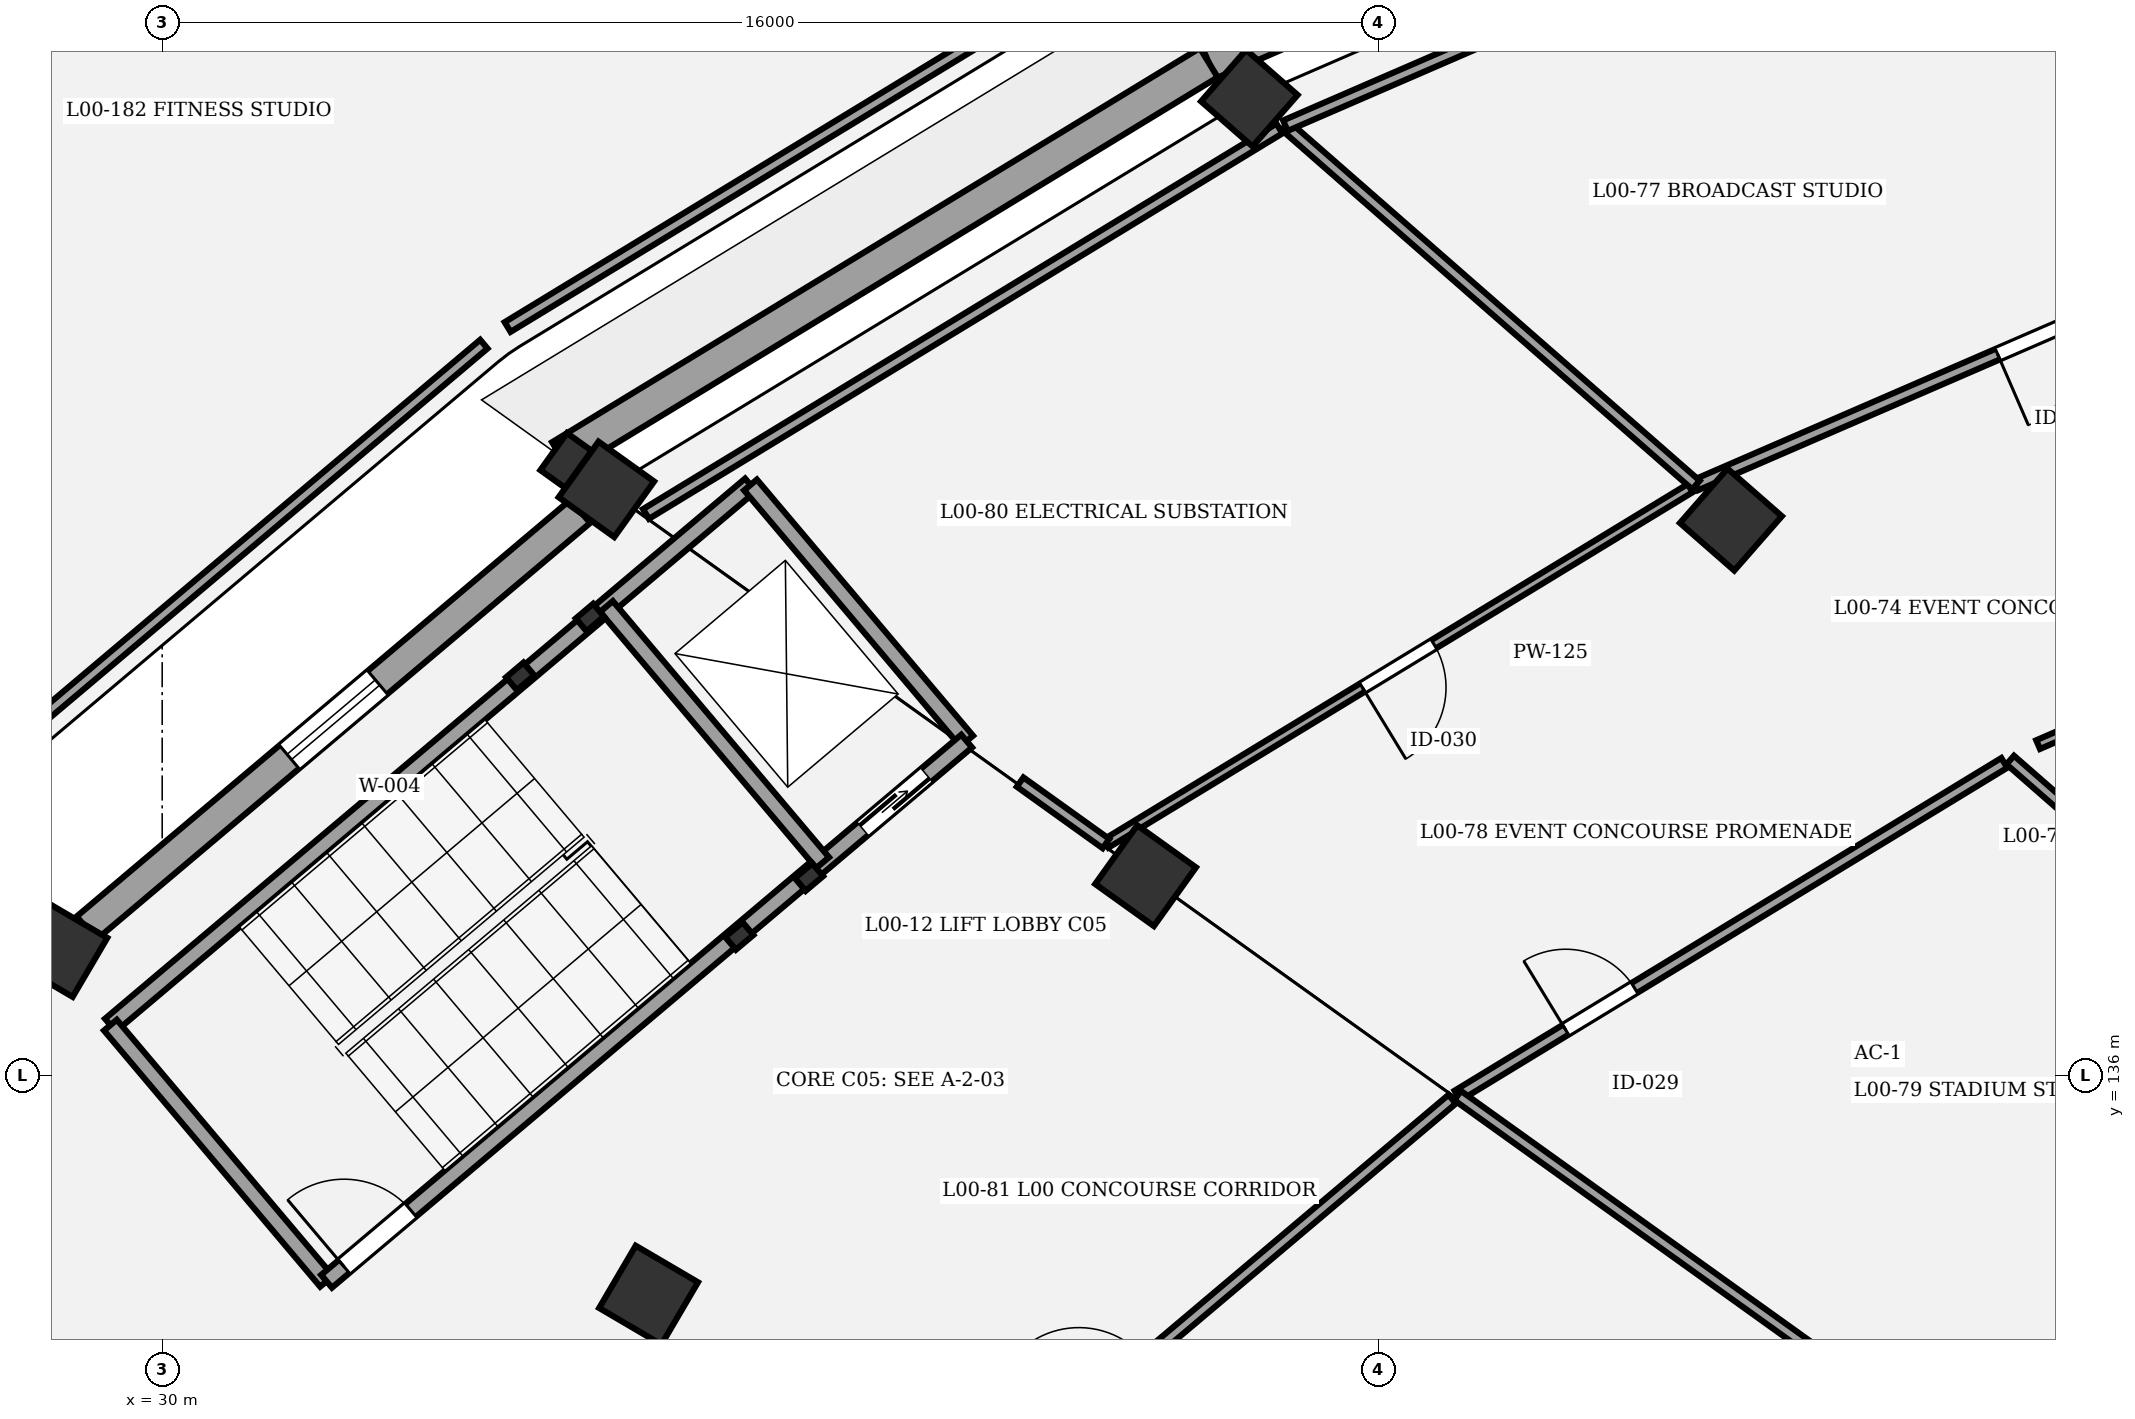
"""IFC4 building model, lengths in metres.
Left out: names, types, materials, properties, quantities, classifications, styles, units other than length and angle.
Written with IfcOpenShell. Run it as: python <this file> out.ifc"""

import sys

from ifc_helpers import new_model, si_unit, direction, frame, frame_2d, origin, origin_2d, place, context, subcontext, project, spatial, rectangle, extrude, element, fill, save


model = new_model("IFC4")
c1 = context("Model", 3, precision=1e-05, world=origin(), true_north=direction((0.0, 1.0)))
c2 = subcontext(c1, "Body", "Model", "MODEL_VIEW")
j1 = project(units=[si_unit("LENGTHUNIT", "METRE"), si_unit("PLANEANGLEUNIT", "RADIAN")], contexts=[c1])
p1 = place(None, origin())
s1 = spatial("IfcSite", under=j1, at=p1, CompositionType="ELEMENT")
p2 = place(p1, origin())
s2 = spatial("IfcBuilding", under=s1, at=p2, CompositionType="ELEMENT")
p3 = place(p2, origin())
s3 = spatial("IfcBuildingStorey", under=s2, at=p3, CompositionType="ELEMENT", Elevation=0.0)
p4 = place(p3, frame((50.64, 143.317, 0.0), z_axis=(0.0, 0.0, 1.0), x_axis=(-0.752529860433, 0.658558128912, 0.0)))
e1 = element("IfcColumn", 1, at=p4, inside=s3, PredefinedType="COLUMN", context=c2, shape_type="SweptSolid", body=[
    extrude(rectangle(XDim=0.95, YDim=0.95, at=origin_2d()), origin(), (0.0, 0.0, 1.0), 5.4),
])
p5 = place(p3, frame((44.304, 148.861, 0.0), z_axis=(0.0, 0.0, 1.0), x_axis=(-0.752529860433, 0.658558128912, 0.0)))
e2 = element("IfcColumn", 2, at=p5, inside=s3, PredefinedType="COLUMN", context=c2, shape_type="SweptSolid", body=[
    extrude(rectangle(XDim=0.9, YDim=0.9, at=origin_2d()), origin(), (0.0, 0.0, 1.0), 5.4),
])
p6 = place(p3, frame((42.939, 138.632, 0.0), z_axis=(0.0, 0.0, 1.0), x_axis=(-0.812897512265, 0.582406760395, 0.0)))
e3 = element("IfcColumn", 3, at=p6, inside=s3, PredefinedType="COLUMN", context=c2, shape_type="SweptSolid", body=[
    extrude(rectangle(XDim=0.95, YDim=0.95, at=origin_2d()), origin(), (0.0, 0.0, 1.0), 5.4),
])
p7 = place(p3, frame((35.844, 143.715, 0.0), z_axis=(0.0, 0.0, 1.0), x_axis=(-0.812897512265, 0.582406760395, 0.0)))
e4 = element("IfcColumn", 4, at=p7, inside=s3, PredefinedType="COLUMN", context=c2, shape_type="SweptSolid", body=[
    extrude(rectangle(XDim=0.9, YDim=0.9, at=origin_2d()), origin(), (0.0, 0.0, 1.0), 5.4),
])
p8 = place(p3, frame((35.314, 144.095, 0.0), z_axis=(0.0, 0.0, 1.0), x_axis=(-0.582406760395, -0.812897512265, 0.0)))
e5 = element("IfcColumn", 5, at=p8, inside=s3, PredefinedType="PILASTER", context=c2, shape_type="SweptSolid", body=[
    extrude(rectangle(XDim=0.6, YDim=0.4, at=origin_2d()), origin(), (0.0, 0.0, 1.0), 5.4),
])
p9 = place(p3, frame((36.4, 133.114, 0.0), z_axis=(0.0, 0.0, 1.0), x_axis=(-0.862513669207, 0.506033764121, 0.0)))
e6 = element("IfcColumn", 6, at=p9, inside=s3, PredefinedType="COLUMN", context=c2, shape_type="SweptSolid", body=[
    extrude(rectangle(XDim=0.95, YDim=0.95, at=origin_2d()), origin(), (0.0, 0.0, 1.0), 5.4),
])
p10 = place(p3, frame((28.662, 137.654, 0.0), z_axis=(0.0, 0.0, 1.0), x_axis=(-0.862513669207, 0.506033764121, 0.0)))
e7 = element("IfcColumn", 7, at=p10, inside=s3, PredefinedType="COLUMN", context=c2, shape_type="SweptSolid", body=[
    extrude(rectangle(XDim=0.9, YDim=0.9, at=origin_2d()), origin(), (0.0, 0.0, 1.0), 5.4),
])
p11 = place(p3, frame((53.603, 153.59, 0.0), z_axis=(0.0, 0.0, 1.0), x_axis=(-0.917502700529, -0.397729549471, 0.0)))
e8 = element("IfcWall", 8, at=p11, inside=s3, PredefinedType="USERDEFINED", context=c2, shape_type="SweptSolid", body=[
    extrude(rectangle(XDim=10.716, YDim=0.45, at=frame_2d((5.358, 0.0))), origin(), (0.0, 0.0, 1.0), 4.25),
])
p12 = place(p3, frame((43.77, 149.328, 0.0), z_axis=(0.0, 0.0, 1.0), x_axis=(-0.854319977813, -0.519747415106, 0.0)))
e9 = element("IfcWall", 9, at=p12, inside=s3, PredefinedType="USERDEFINED", context=c2, shape_type="SweptSolid", body=[
    extrude(rectangle(XDim=9.977, YDim=0.45, at=frame_2d((4.988, 0.0))), origin(), (0.0, 0.0, 1.0), 4.25),
])
p13 = place(p3, frame((29.004, 137.942, 0.0), z_axis=(0.0, 0.0, 1.0), x_axis=(0.764254773348, 0.644914445035, 0.0)))
e10 = element("IfcWall", 10, at=p13, inside=s3, PredefinedType="STANDARD", context=c2, shape_type="SweptSolid", body=[
    extrude(rectangle(XDim=8.502, YDim=0.4, at=frame_2d((4.251, 0.0))), origin(), (0.0, 0.0, 1.0), 4.25),
])
p14 = place(p13, frame((3.491, 0.0, 1.1)))
e11 = element("IfcOpeningElement", 11, at=p14, cuts=e10, PredefinedType="OPENING", context=c2, shape_type="SweptSolid", body=[
    extrude(rectangle(XDim=1.52, YDim=1.55, at=frame_2d((0.76, 0.775))), frame((0.0, 0.21, 0.0), z_axis=(0.0, -1.0, 0.0), x_axis=(1.0, 0.0, 0.0)), (0.0, 0.0, 1.0), 0.42),
])
for number, where, z_axis, x_axis in (
    (12, (37.593, 137.839, 0.0), (0.0, 0.0, 1.0), (0.764, 0.645, 0.0)),
    (13, (38.51, 138.613, 0.0), (0.0, 0.0, 1.0), (0.764, 0.645, 0.0)),
    (14, (35.627, 142.029, 0.0), (0.0, 0.0, 1.0), (0.764, 0.645, 0.0)),
    (15, (34.71, 141.255, 0.0), (0.0, 0.0, 1.0), (0.764, 0.645, 0.0)),
):
    element("IfcColumn", number, at=place(p3, frame(where, z_axis=z_axis, x_axis=x_axis)), inside=s3, PredefinedType="COLUMN", context=c2, shape_type="SweptSolid", body=[
        extrude(rectangle(XDim=0.3, YDim=0.22, at=origin_2d()), origin(), (0.0, 0.0, 1.0), 5.4),
    ])
p15 = place(p3, frame((29.319, 136.666, 0.0), z_axis=(0.0, 0.0, 1.0), x_axis=(0.764247804305, 0.644922703598, 0.0)))
e16 = element("IfcWall", 16, at=p15, inside=s3, PredefinedType="SHEAR", context=c2, shape_type="SweptSolid", body=[
    extrude(rectangle(XDim=11.02, YDim=0.22, at=frame_2d((5.51, 0.0))), origin(), (0.0, 0.0, 1.0), 5.15),
])
p16 = place(p3, frame((32.163, 133.296, 0.0), z_axis=(0.0, 0.0, 1.0), x_axis=(-0.644904288042, 0.764263344185, 0.0)))
e17 = element("IfcWall", 17, at=p16, inside=s3, PredefinedType="SHEAR", context=c2, shape_type="SweptSolid", body=[
    extrude(rectangle(XDim=4.41, YDim=0.22, at=frame_2d((2.205, 0.0))), origin(), (0.0, 0.0, 1.0), 5.15),
])
p17 = place(p3, frame((40.585, 140.403, 0.0), z_axis=(0.0, 0.0, 1.0), x_axis=(-0.644936622785, 0.764236058159, 0.0)))
e18 = element("IfcWall", 18, at=p17, inside=s3, PredefinedType="SHEAR", context=c2, shape_type="SweptSolid", body=[
    extrude(rectangle(XDim=4.41, YDim=0.22, at=frame_2d((2.205, 0.0))), origin(), (0.0, 0.0, 1.0), 5.15),
])
p18 = place(p3, frame((32.163, 133.296, 0.0), z_axis=(0.0, 0.0, 1.0), x_axis=(0.764257018762, 0.644911784102, 0.0)))
e19 = element("IfcWall", 19, at=p18, inside=s3, PredefinedType="SHEAR", context=c2, shape_type="SweptSolid", body=[
    extrude(rectangle(XDim=11.02, YDim=0.22, at=frame_2d((5.51, 0.0))), origin(), (0.0, 0.0, 1.0), 5.15),
])
p19 = place(p18, frame((0.3, 0.0, 0.0)))
e20 = element("IfcOpeningElement", 20, at=p19, cuts=e19, PredefinedType="OPENING", context=c2, shape_type="SweptSolid", body=[
    extrude(rectangle(XDim=1.15, YDim=2.15, at=frame_2d((0.575, 1.075))), frame((0.0, 0.12, 0.0), z_axis=(0.0, -1.0, 0.0), x_axis=(1.0, 0.0, 0.0)), (0.0, 0.0, 1.0), 0.24),
])
p20 = place(p18, frame((9.23, 0.0, 0.0)))
e21 = element("IfcOpeningElement", 21, at=p20, cuts=e19, PredefinedType="OPENING", context=c2, shape_type="SweptSolid", body=[
    extrude(rectangle(XDim=1.1, YDim=2.15, at=frame_2d((0.55, 1.075))), frame((0.0, 0.12, 0.0), z_axis=(0.0, -1.0, 0.0), x_axis=(1.0, 0.0, 0.0)), (0.0, 0.0, 1.0), 0.24),
])
p21 = place(p3, frame((38.689, 138.803, 0.0), z_axis=(0.0, 0.0, 1.0), x_axis=(-0.644904288042, 0.764263344185, 0.0)))
e22 = element("IfcWall", 22, at=p21, inside=s3, PredefinedType="SHEAR", context=c2, shape_type="SweptSolid", body=[
    extrude(rectangle(XDim=4.41, YDim=0.22, at=frame_2d((2.205, 0.0))), origin(), (0.0, 0.0, 1.0), 5.15),
])
p22 = place(p3, frame((58.435, 141.983, 0.0), z_axis=(0.0, 0.0, 1.0), x_axis=(-0.917504086034, -0.397726353303, 0.0)))
e23 = element("IfcWall", 23, at=p22, inside=s3, PredefinedType="PARTITIONING", context=c2, shape_type="SweptSolid", body=[
    extrude(rectangle(XDim=4.091, YDim=0.125, at=frame_2d((2.045, 0.0))), origin(), (0.0, 0.0, 1.0), 4.15),
])
p23 = place(p22, frame((0.814, 0.0, 0.0)))
e24 = element("IfcOpeningElement", 24, at=p23, cuts=e23, PredefinedType="OPENING", context=c2, shape_type="SweptSolid", body=[
    extrude(rectangle(XDim=0.98, YDim=2.3, at=frame_2d((0.49, 1.15))), frame((0.0, 0.073, 0.0), z_axis=(0.0, -1.0, 0.0), x_axis=(1.0, 0.0, 0.0)), (0.0, 0.0, 1.0), 0.145),
])
p24 = place(p3, frame((59.054, 147.619, 0.0), z_axis=(0.0, 0.0, 1.0), x_axis=(-0.917508957037, -0.39771511633, 0.0)))
e25 = element("IfcWall", 25, at=p24, inside=s3, PredefinedType="PARTITIONING", context=c2, shape_type="SweptSolid", body=[
    extrude(rectangle(XDim=9.671, YDim=0.15, at=frame_2d((4.836, 0.0))), origin(), (0.0, 0.0, 1.0), 4.15),
])
p25 = place(p24, frame((4.326, 0.0, 0.0)))
e26 = element("IfcOpeningElement", 26, at=p25, cuts=e25, PredefinedType="OPENING", context=c2, shape_type="SweptSolid", body=[
    extrude(rectangle(XDim=1.02, YDim=2.3, at=frame_2d((0.51, 1.15))), frame((0.0, 0.085, 0.0), z_axis=(0.0, -1.0, 0.0), x_axis=(1.0, 0.0, 0.0)), (0.0, 0.0, 1.0), 0.17),
])
p26 = place(p3, frame((47.043, 135.74, 0.0), z_axis=(0.0, 0.0, 1.0), x_axis=(0.854330104408, 0.519730769439, 0.0)))
e27 = element("IfcWall", 27, at=p26, inside=s3, PredefinedType="PARTITIONING", context=c2, shape_type="SweptSolid", body=[
    extrude(rectangle(XDim=8.42, YDim=0.15, at=frame_2d((4.21, 0.0))), origin(), (0.0, 0.0, 1.0), 4.15),
])
p27 = place(p26, frame((1.664, 0.0, 0.0)))
e28 = element("IfcOpeningElement", 28, at=p27, cuts=e27, PredefinedType="OPENING", context=c2, shape_type="SweptSolid", body=[
    extrude(rectangle(XDim=1.06, YDim=2.3, at=frame_2d((0.53, 1.15))), frame((0.0, 0.085, 0.0), z_axis=(0.0, -1.0, 0.0), x_axis=(1.0, 0.0, 0.0)), (0.0, 0.0, 1.0), 0.17),
])
p28 = place(p3, frame((50.105, 143.731, 0.0), z_axis=(0.0, 0.0, 1.0), x_axis=(-0.854321649351, -0.519744667554, 0.0)))
e29 = element("IfcWall", 29, at=p28, inside=s3, PredefinedType="PARTITIONING", context=c2, shape_type="SweptSolid", body=[
    extrude(rectangle(XDim=8.999, YDim=0.125, at=frame_2d((4.499, 0.0))), origin(), (0.0, 0.0, 1.0), 4.15),
])
p29 = place(p28, frame((3.949, 0.0, 0.0)))
e30 = element("IfcOpeningElement", 30, at=p29, cuts=e29, PredefinedType="OPENING", context=c2, shape_type="SweptSolid", body=[
    extrude(rectangle(XDim=1.1, YDim=2.3, at=frame_2d((0.55, 1.15))), frame((0.0, 0.073, 0.0), z_axis=(0.0, -1.0, 0.0), x_axis=(1.0, 0.0, 0.0)), (0.0, 0.0, 1.0), 0.145),
])
p30 = place(p3, frame((40.867, 130.539, 0.0), z_axis=(0.0, 0.0, 1.0), x_axis=(0.764249122867, 0.644921141068, 0.0)))
e31 = element("IfcWall", 31, at=p30, inside=s3, PredefinedType="PARTITIONING", context=c2, shape_type="SweptSolid", body=[
    extrude(rectangle(XDim=7.99, YDim=0.15, at=frame_2d((3.995, 0.0))), origin(), (0.0, 0.0, 1.0), 4.15),
])
p31 = place(p30, frame((1.562, 0.0, 0.0)))
e32 = element("IfcOpeningElement", 32, at=p31, cuts=e31, PredefinedType="OPENING", context=c2, shape_type="SweptSolid", body=[
    extrude(rectangle(XDim=1.14, YDim=2.3, at=frame_2d((0.57, 1.15))), frame((0.0, 0.085, 0.0), z_axis=(0.0, -1.0, 0.0), x_axis=(1.0, 0.0, 0.0)), (0.0, 0.0, 1.0), 0.17),
])
p32 = place(p3, frame((58.435, 136.549, 0.0), z_axis=(0.0, 0.0, 1.0), x_axis=(-0.752593271743, 0.658485662203, 0.0)))
e33 = element("IfcWall", 33, at=p32, inside=s3, PredefinedType="PARTITIONING", context=c2, shape_type="SweptSolid", body=[
    extrude(rectangle(XDim=5.474, YDim=0.15, at=frame_2d((2.737, 0.0))), origin(), (0.0, 0.0, 1.0), 4.15),
])
p33 = place(p3, frame((50.18, 143.772, 0.0), z_axis=(0.0, 0.0, 1.0), x_axis=(-0.752576694707, 0.658504607869, 0.0)))
e34 = element("IfcWall", 34, at=p33, inside=s3, PredefinedType="PARTITIONING", context=c2, shape_type="SweptSolid", body=[
    extrude(rectangle(XDim=7.178, YDim=0.15, at=frame_2d((3.589, 0.0))), origin(), (0.0, 0.0, 1.0), 4.15),
])
p34 = place(p3, frame((44.778, 148.499, 0.0), z_axis=(0.0, 0.0, 1.0), x_axis=(0.917505556499, 0.397722961109, 0.0)))
e35 = element("IfcWall", 35, at=p34, inside=s3, PredefinedType="PARTITIONING", context=c2, shape_type="SweptSolid", body=[
    extrude(rectangle(XDim=9.845, YDim=0.15, at=frame_2d((4.922, 0.0))), origin(), (0.0, 0.0, 1.0), 4.15),
])
p35 = place(p3, frame((59.369, 126.909, 0.0), z_axis=(0.0, 0.0, 1.0), x_axis=(-0.812885100642, 0.582424083597, 0.0)))
e36 = element("IfcWall", 36, at=p35, inside=s3, PredefinedType="PARTITIONING", context=c2, shape_type="SweptSolid", body=[
    extrude(rectangle(XDim=15.163, YDim=0.15, at=frame_2d((7.581, 0.0))), origin(), (0.0, 0.0, 1.0), 4.15),
])
p36 = place(p3, frame((36.365, 143.391, 0.0), z_axis=(0.0, 0.0, 1.0), x_axis=(0.854323689683, 0.519741313777, 0.0)))
e37 = element("IfcWall", 37, at=p36, inside=s3, PredefinedType="PARTITIONING", context=c2, shape_type="SweptSolid", body=[
    extrude(rectangle(XDim=9.756, YDim=0.15, at=frame_2d((4.878, 0.0))), origin(), (0.0, 0.0, 1.0), 4.15),
])
p37 = place(p3, frame((42.418, 139.054, 0.0), z_axis=(0.0, 0.0, 1.0), x_axis=(-0.812925279681, 0.582368001916, 0.0)))
e38 = element("IfcWall", 38, at=p37, inside=s3, PredefinedType="PARTITIONING", context=c2, shape_type="SweptSolid", body=[
    extrude(rectangle(XDim=1.389, YDim=0.15, at=frame_2d((0.695, 0.0))), origin(), (0.0, 0.0, 1.0), 4.15),
])
p38 = place(p3, frame((43.004, 150.997, 0.0), z_axis=(0.0, 0.0, 1.0), x_axis=(-0.854333268174, -0.519725568826, 0.0)))
e39 = element("IfcWall", 39, at=p38, inside=s3, PredefinedType="PARTITIONING", context=c2, shape_type="SweptSolid", body=[
    extrude(rectangle(XDim=9.902, YDim=0.15, at=frame_2d((4.951, 0.0))), origin(), (0.0, 0.0, 1.0), 4.15),
])
p39 = place(p3, frame((34.232, 145.625, 0.0), z_axis=(0.0, 0.0, 1.0), x_axis=(-0.76426547638, -0.644901761212, 0.0)))
e40 = element("IfcWall", 40, at=p39, inside=s3, PredefinedType="PARTITIONING", context=c2, shape_type="SweptSolid", body=[
    extrude(rectangle(XDim=9.398, YDim=0.15, at=frame_2d((4.699, 0.0))), origin(), (0.0, 0.0, 1.0), 4.15),
])
p40 = place(p14, origin())
e41 = element("IfcWindow", 41, at=p40, inside=s3, PartitioningType="SINGLE_PANEL", PredefinedType="WINDOW", context=c2, shape_type="SweptSolid", body=[
    extrude(rectangle(XDim=1.52, YDim=1.55, at=frame_2d((0.76, 0.775))), frame((0.0, 0.03, 0.0), z_axis=(0.0, -1.0, 0.0), x_axis=(1.0, 0.0, 0.0)), (0.0, 0.0, 1.0), 0.06),
])
fill(e11, e41)
p41 = place(p19, origin())
e42 = element("IfcDoor", 42, at=p41, inside=s3, OperationType="SINGLE_SWING_LEFT", PredefinedType="DOOR", context=c2, shape_type="SweptSolid", body=[
    extrude(rectangle(XDim=1.15, YDim=2.15, at=frame_2d((0.575, 1.075))), frame((0.0, 0.025, 0.0), z_axis=(0.0, -1.0, 0.0), x_axis=(1.0, 0.0, 0.0)), (0.0, 0.0, 1.0), 0.05),
])
fill(e20, e42)
p42 = place(p20, origin())
e43 = element("IfcDoor", 43, at=p42, inside=s3, OperationType="DOUBLE_DOOR_SLIDING", PredefinedType="DOOR", context=c2, shape_type="SweptSolid", body=[
    extrude(rectangle(XDim=1.1, YDim=2.15, at=frame_2d((0.55, 1.075))), frame((0.0, 0.025, 0.0), z_axis=(0.0, -1.0, 0.0), x_axis=(1.0, 0.0, 0.0)), (0.0, 0.0, 1.0), 0.05),
])
fill(e21, e43)
p43 = place(p25, origin())
e44 = element("IfcDoor", 44, at=p43, inside=s3, OperationType="SINGLE_SWING_RIGHT", PredefinedType="DOOR", context=c2, shape_type="SweptSolid", body=[
    extrude(rectangle(XDim=1.02, YDim=2.3, at=frame_2d((0.51, 1.15))), frame((0.0, 0.025, 0.0), z_axis=(0.0, -1.0, 0.0), x_axis=(1.0, 0.0, 0.0)), (0.0, 0.0, 1.0), 0.05),
])
fill(e26, e44)
p44 = place(p27, origin())
e45 = element("IfcDoor", 45, at=p44, inside=s3, OperationType="SINGLE_SWING_LEFT", PredefinedType="DOOR", context=c2, shape_type="SweptSolid", body=[
    extrude(rectangle(XDim=1.06, YDim=2.3, at=frame_2d((0.53, 1.15))), frame((0.0, 0.025, 0.0), z_axis=(0.0, -1.0, 0.0), x_axis=(1.0, 0.0, 0.0)), (0.0, 0.0, 1.0), 0.05),
])
fill(e28, e45)
p45 = place(p29, origin())
e46 = element("IfcDoor", 46, at=p45, inside=s3, OperationType="SINGLE_SWING_RIGHT", PredefinedType="DOOR", context=c2, shape_type="SweptSolid", body=[
    extrude(rectangle(XDim=1.1, YDim=2.3, at=frame_2d((0.55, 1.15))), frame((0.0, 0.025, 0.0), z_axis=(0.0, -1.0, 0.0), x_axis=(1.0, 0.0, 0.0)), (0.0, 0.0, 1.0), 0.05),
])
fill(e30, e46)
save(model, sys.argv[1])
